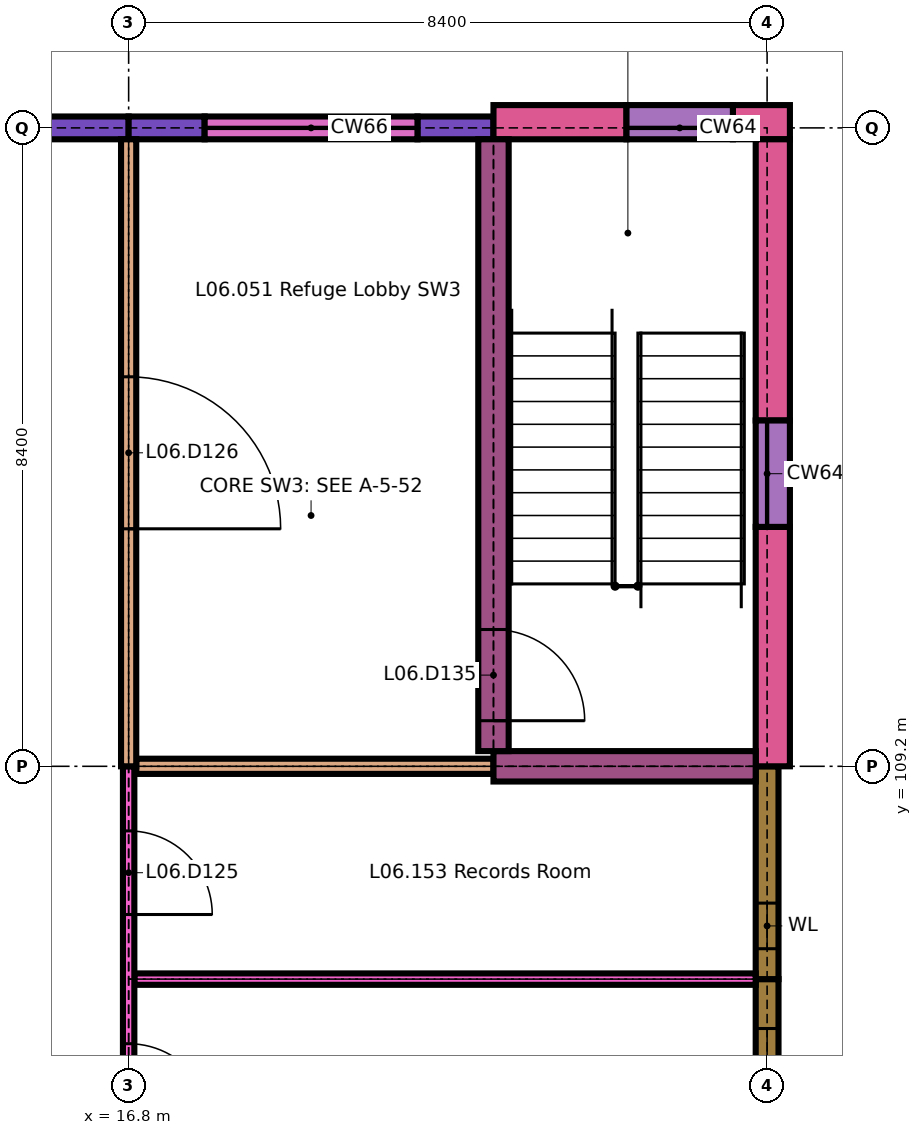
"""IFC4 building model, lengths in metres.
Left out: names, types, materials, properties, quantities, classifications, styles, units other than length and angle.
Written with IfcOpenShell. Run it as: python <this file> out.ifc"""

import sys

from ifc_helpers import new_model, si_unit, direction, frame, frame_2d, origin, place, context, subcontext, project, spatial, rectangle, extrude, element, fill, save


model = new_model("IFC4")
c1 = context("Model", 3, precision=1e-05, world=origin(), true_north=direction((0.0, 1.0)))
c2 = subcontext(c1, "Body", "Model", "MODEL_VIEW")
j1 = project(units=[si_unit("LENGTHUNIT", "METRE"), si_unit("PLANEANGLEUNIT", "RADIAN")], contexts=[c1])
p1 = place(None, origin())
s1 = spatial("IfcSite", under=j1, at=p1, CompositionType="ELEMENT")
p2 = place(p1, origin())
s2 = spatial("IfcBuilding", under=s1, at=p2, CompositionType="ELEMENT")
p3 = place(p2, frame((0.0, 0.0, 26.1)))
s3 = spatial("IfcBuildingStorey", under=s2, at=p3, CompositionType="ELEMENT", Elevation=26.1)
p4 = place(p3, frame((13.8, 117.6, 0.0), z_axis=(0.0, 0.0, 1.0), x_axis=(1.0, 0.0, 0.0)))
e1 = element("IfcWall", 1, at=p4, inside=s3, PredefinedType="SOLIDWALL", context=c2, shape_type="SweptSolid", body=[
    extrude(rectangle(XDim=3.0, YDim=0.3, at=frame_2d((1.5, 0.0))), origin(), (0.0, 0.0, 1.0), 3.3),
])
p5 = place(p4, frame((0.45, 0.0, 0.9)))
e2 = element("IfcOpeningElement", 2, at=p5, cuts=e1, PredefinedType="OPENING", context=c2, shape_type="SweptSolid", body=[
    extrude(rectangle(XDim=0.9, YDim=1.5, at=frame_2d((0.45, 0.75))), frame((0.0, 0.16, 0.0), z_axis=(0.0, -1.0, 0.0), x_axis=(1.0, 0.0, 0.0)), (0.0, 0.0, 1.0), 0.32),
])
for number, where, z_axis, x_axis in (
    (3, (16.8, 117.6, 0.0), (0.0, 0.0, 1.0), (1.0, 0.0, 0.0)),
    (4, (20.6, 117.6, 0.0), (0.0, 0.0, 1.0), (1.0, 0.0, 0.0)),
):
    element("IfcWall", number, at=place(p3, frame(where, z_axis=z_axis, x_axis=x_axis)), inside=s3, PredefinedType="SOLIDWALL", context=c2, shape_type="SweptSolid", body=[
        extrude(rectangle(XDim=1.0, YDim=0.3, at=frame_2d((0.5, 0.0))), origin(), (0.0, 0.0, 1.0), 3.3),
    ])
p6 = place(p3, frame((17.8, 117.6, 0.0), z_axis=(0.0, 0.0, 1.0), x_axis=(1.0, 0.0, 0.0)))
e5 = element("IfcWall", 5, at=p6, inside=s3, PredefinedType="SOLIDWALL", context=c2, shape_type="SweptSolid", body=[
    extrude(rectangle(XDim=2.8, YDim=0.3, at=frame_2d((1.4, 0.0))), origin(), (0.0, 0.0, 1.0), 0.6),
])
p7 = place(p3, frame((21.6, 117.675, 0.0), z_axis=(0.0, 0.0, 1.0), x_axis=(1.0, 0.0, 0.0)))
e6 = element("IfcWall", 6, at=p7, inside=s3, PredefinedType="SOLIDWALL", context=c2, shape_type="SweptSolid", body=[
    extrude(rectangle(XDim=1.75, YDim=0.45, at=frame_2d((0.875, 0.0))), origin(), (0.0, 0.0, 1.0), 3.3),
])
p8 = place(p3, frame((24.75, 117.675, 0.0), z_axis=(0.0, 0.0, 1.0), x_axis=(1.0, 0.0, 0.0)))
e7 = element("IfcWall", 7, at=p8, inside=s3, PredefinedType="SOLIDWALL", context=c2, shape_type="SweptSolid", body=[
    extrude(rectangle(XDim=0.75, YDim=0.45, at=frame_2d((0.375, 0.0))), origin(), (0.0, 0.0, 1.0), 3.3),
])
p9 = place(p3, frame((23.35, 117.675, 0.0), z_axis=(0.0, 0.0, 1.0), x_axis=(1.0, 0.0, 0.0)))
e8 = element("IfcWall", 8, at=p9, inside=s3, PredefinedType="SOLIDWALL", context=c2, shape_type="SweptSolid", body=[
    extrude(rectangle(XDim=1.4, YDim=0.45, at=frame_2d((0.7, 0.0))), origin(), (0.0, 0.0, 1.0), 0.6),
])
p10 = place(p3, frame((25.2, 103.6, 0.0), z_axis=(0.0, 0.0, 1.0), x_axis=(0.0, 1.0, 0.0)))
e9 = element("IfcWall", 9, at=p10, inside=s3, PredefinedType="SOLIDWALL", context=c2, shape_type="SweptSolid", body=[
    extrude(rectangle(XDim=2.8, YDim=0.3, at=frame_2d((1.4, 0.0))), origin(), (0.0, 0.0, 1.0), 2.9),
])
p11 = place(p10, frame((0.65, 0.0, 0.9)))
e10 = element("IfcOpeningElement", 10, at=p11, cuts=e9, PredefinedType="OPENING", context=c2, shape_type="SweptSolid", body=[
    extrude(rectangle(XDim=1.5, YDim=1.5, at=frame_2d((0.75, 0.75))), frame((0.0, 0.16, 0.0), z_axis=(0.0, -1.0, 0.0), x_axis=(1.0, 0.0, 0.0)), (0.0, 0.0, 1.0), 0.32),
])
p12 = place(p3, frame((25.2, 106.4, 0.0), z_axis=(0.0, 0.0, 1.0), x_axis=(0.0, 1.0, 0.0)))
e11 = element("IfcWall", 11, at=p12, inside=s3, PredefinedType="SOLIDWALL", context=c2, shape_type="SweptSolid", body=[
    extrude(rectangle(XDim=2.8, YDim=0.3, at=frame_2d((1.4, 0.0))), origin(), (0.0, 0.0, 1.0), 2.9),
])
p13 = place(p12, frame((0.4, 0.0, 0.9)))
e12 = element("IfcOpeningElement", 12, at=p13, cuts=e11, PredefinedType="OPENING", context=c2, shape_type="SweptSolid", body=[
    extrude(rectangle(XDim=0.6, YDim=1.5, at=frame_2d((0.3, 0.75))), frame((0.0, 0.16, 0.0), z_axis=(0.0, -1.0, 0.0), x_axis=(1.0, 0.0, 0.0)), (0.0, 0.0, 1.0), 0.32),
])
p14 = place(p3, frame((25.275, 109.2, 0.0), z_axis=(0.0, 0.0, 1.0), x_axis=(0.0, 1.0, 0.0)))
e13 = element("IfcWall", 13, at=p14, inside=s3, PredefinedType="SOLIDWALL", context=c2, shape_type="SweptSolid", body=[
    extrude(rectangle(XDim=3.15, YDim=0.45, at=frame_2d((1.575, 0.0))), origin(), (0.0, 0.0, 1.0), 3.3),
])
p15 = place(p3, frame((25.275, 113.75, 0.0), z_axis=(0.0, 0.0, 1.0), x_axis=(0.0, 1.0, 0.0)))
e14 = element("IfcWall", 14, at=p15, inside=s3, PredefinedType="SOLIDWALL", context=c2, shape_type="SweptSolid", body=[
    extrude(rectangle(XDim=3.7, YDim=0.45, at=frame_2d((1.85, 0.0))), origin(), (0.0, 0.0, 1.0), 3.3),
])
p16 = place(p3, frame((25.275, 112.35, 0.0), z_axis=(0.0, 0.0, 1.0), x_axis=(0.0, 1.0, 0.0)))
e15 = element("IfcWall", 15, at=p16, inside=s3, PredefinedType="SOLIDWALL", context=c2, shape_type="SweptSolid", body=[
    extrude(rectangle(XDim=1.4, YDim=0.45, at=frame_2d((0.7, 0.0))), origin(), (0.0, 0.0, 1.0), 0.6),
])
p17 = place(p3, frame((16.875, 106.4, 0.0), z_axis=(0.0, 0.0, 1.0), x_axis=(1.0, 0.0, 0.0)))
e16 = element("IfcWall", 16, at=p17, inside=s3, PredefinedType="PARTITIONING", context=c2, shape_type="SweptSolid", body=[
    extrude(rectangle(XDim=8.175, YDim=0.15, at=frame_2d((4.087, 0.0))), origin(), (0.0, 0.0, 1.0), 3.3),
])
p18 = place(p3, frame((16.9, 109.2, 0.0), z_axis=(0.0, 0.0, 1.0), x_axis=(1.0, 0.0, 0.0)))
e17 = element("IfcWall", 17, at=p18, inside=s3, PredefinedType="PARTITIONING", context=c2, shape_type="SweptSolid", body=[
    extrude(rectangle(XDim=4.7, YDim=0.2, at=frame_2d((2.35, 0.0))), origin(), (0.0, 0.0, 1.0), 3.3),
])
p19 = place(p3, frame((21.6, 109.2, 0.0), z_axis=(0.0, 0.0, 1.0), x_axis=(1.0, 0.0, 0.0)))
e18 = element("IfcWall", 18, at=p19, inside=s3, PredefinedType="SHEAR", context=c2, shape_type="SweptSolid", body=[
    extrude(rectangle(XDim=3.45, YDim=0.4, at=frame_2d((1.725, 0.0))), origin(), (0.0, 0.0, 1.0), 3.3),
])
p20 = place(p3, frame((16.8, 101.15, 0.0), z_axis=(0.0, 0.0, 1.0), x_axis=(0.0, 1.0, 0.0)))
e19 = element("IfcWall", 19, at=p20, inside=s3, PredefinedType="PARTITIONING", context=c2, shape_type="SweptSolid", body=[
    extrude(rectangle(XDim=8.05, YDim=0.15, at=frame_2d((4.025, 0.0))), origin(), (0.0, 0.0, 1.0), 3.3),
])
p21 = place(p20, frame((0.675, 0.0, 0.0)))
e20 = element("IfcOpeningElement", 20, at=p21, cuts=e19, PredefinedType="OPENING", context=c2, shape_type="SweptSolid", body=[
    extrude(rectangle(XDim=1.1, YDim=2.1, at=frame_2d((0.55, 1.05))), frame((0.0, 0.085, 0.0), z_axis=(0.0, -1.0, 0.0), x_axis=(1.0, 0.0, 0.0)), (0.0, 0.0, 1.0), 0.17),
])
p22 = place(p20, frame((3.3, 0.0, 0.0)))
e21 = element("IfcOpeningElement", 21, at=p22, cuts=e19, PredefinedType="OPENING", context=c2, shape_type="SweptSolid", body=[
    extrude(rectangle(XDim=1.1, YDim=2.1, at=frame_2d((0.55, 1.05))), frame((0.0, 0.085, 0.0), z_axis=(0.0, -1.0, 0.0), x_axis=(1.0, 0.0, 0.0)), (0.0, 0.0, 1.0), 0.17),
])
p23 = place(p20, frame((6.1, 0.0, 0.0)))
e22 = element("IfcOpeningElement", 22, at=p23, cuts=e19, PredefinedType="OPENING", context=c2, shape_type="SweptSolid", body=[
    extrude(rectangle(XDim=1.1, YDim=2.1, at=frame_2d((0.55, 1.05))), frame((0.0, 0.085, 0.0), z_axis=(0.0, -1.0, 0.0), x_axis=(1.0, 0.0, 0.0)), (0.0, 0.0, 1.0), 0.17),
])
p24 = place(p3, frame((16.8, 109.2, 0.0), z_axis=(0.0, 0.0, 1.0), x_axis=(0.0, 1.0, 0.0)))
e23 = element("IfcWall", 23, at=p24, inside=s3, PredefinedType="PARTITIONING", context=c2, shape_type="SweptSolid", body=[
    extrude(rectangle(XDim=8.25, YDim=0.2, at=frame_2d((4.125, 0.0))), origin(), (0.0, 0.0, 1.0), 3.3),
])
p25 = place(p24, frame((3.125, 0.0, 0.0)))
e24 = element("IfcOpeningElement", 24, at=p25, cuts=e23, PredefinedType="OPENING", context=c2, shape_type="SweptSolid", body=[
    extrude(rectangle(XDim=2.0, YDim=2.4, at=frame_2d((1.0, 1.2))), frame((0.0, 0.11, 0.0), z_axis=(0.0, -1.0, 0.0), x_axis=(1.0, 0.0, 0.0)), (0.0, 0.0, 1.0), 0.22),
])
p26 = place(p3, frame((21.6, 109.4, 0.0), z_axis=(0.0, 0.0, 1.0), x_axis=(0.0, 1.0, 0.0)))
e25 = element("IfcWall", 25, at=p26, inside=s3, PredefinedType="SHEAR", context=c2, shape_type="SweptSolid", body=[
    extrude(rectangle(XDim=8.05, YDim=0.4, at=frame_2d((4.025, 0.0))), origin(), (0.0, 0.0, 1.0), 3.3),
])
p27 = place(p26, frame((0.4, 0.0, 0.0)))
e26 = element("IfcOpeningElement", 26, at=p27, cuts=e25, PredefinedType="OPENING", context=c2, shape_type="SweptSolid", body=[
    extrude(rectangle(XDim=1.2, YDim=2.1, at=frame_2d((0.6, 1.05))), frame((0.0, 0.21, 0.0), z_axis=(0.0, -1.0, 0.0), x_axis=(1.0, 0.0, 0.0)), (0.0, 0.0, 1.0), 0.42),
])
p28 = place(p11, origin())
e27 = element("IfcWindow", 27, at=p28, inside=s3, PartitioningType="SINGLE_PANEL", PredefinedType="WINDOW", context=c2, shape_type="SweptSolid", body=[
    extrude(rectangle(XDim=1.5, YDim=1.5, at=frame_2d((0.75, 0.75))), frame((0.0, 0.03, 0.0), z_axis=(0.0, -1.0, 0.0), x_axis=(1.0, 0.0, 0.0)), (0.0, 0.0, 1.0), 0.06),
])
fill(e10, e27)
p29 = place(p13, origin())
e28 = element("IfcWindow", 28, at=p29, inside=s3, PartitioningType="SINGLE_PANEL", PredefinedType="WINDOW", context=c2, shape_type="SweptSolid", body=[
    extrude(rectangle(XDim=0.6, YDim=1.5, at=frame_2d((0.3, 0.75))), frame((0.0, 0.03, 0.0), z_axis=(0.0, -1.0, 0.0), x_axis=(1.0, 0.0, 0.0)), (0.0, 0.0, 1.0), 0.06),
])
fill(e12, e28)
p30 = place(p22, origin())
e29 = element("IfcDoor", 29, at=p30, inside=s3, OperationType="SINGLE_SWING_LEFT", PredefinedType="DOOR", context=c2, shape_type="SweptSolid", body=[
    extrude(rectangle(XDim=1.1, YDim=2.1, at=frame_2d((0.55, 1.05))), frame((0.0, 0.025, 0.0), z_axis=(0.0, -1.0, 0.0), x_axis=(1.0, 0.0, 0.0)), (0.0, 0.0, 1.0), 0.05),
])
fill(e21, e29)
p31 = place(p23, origin())
e30 = element("IfcDoor", 30, at=p31, inside=s3, OperationType="SINGLE_SWING_LEFT", PredefinedType="DOOR", context=c2, shape_type="SweptSolid", body=[
    extrude(rectangle(XDim=1.1, YDim=2.1, at=frame_2d((0.55, 1.05))), frame((0.0, 0.025, 0.0), z_axis=(0.0, -1.0, 0.0), x_axis=(1.0, 0.0, 0.0)), (0.0, 0.0, 1.0), 0.05),
])
fill(e22, e30)
p32 = place(p25, origin())
e31 = element("IfcDoor", 31, at=p32, inside=s3, OperationType="SINGLE_SWING_LEFT", PredefinedType="DOOR", context=c2, shape_type="SweptSolid", body=[
    extrude(rectangle(XDim=2.0, YDim=2.4, at=frame_2d((1.0, 1.2))), frame((0.0, 0.03, 0.0), z_axis=(0.0, -1.0, 0.0), x_axis=(1.0, 0.0, 0.0)), (0.0, 0.0, 1.0), 0.06),
])
fill(e24, e31)
p33 = place(p27, origin())
e32 = element("IfcDoor", 32, at=p33, inside=s3, OperationType="SINGLE_SWING_LEFT", PredefinedType="DOOR", context=c2, shape_type="SweptSolid", body=[
    extrude(rectangle(XDim=1.2, YDim=2.1, at=frame_2d((0.6, 1.05))), frame((0.0, 0.025, 0.0), z_axis=(0.0, -1.0, 0.0), x_axis=(1.0, 0.0, 0.0)), (0.0, 0.0, 1.0), 0.05),
])
fill(e26, e32)
save(model, sys.argv[1])
